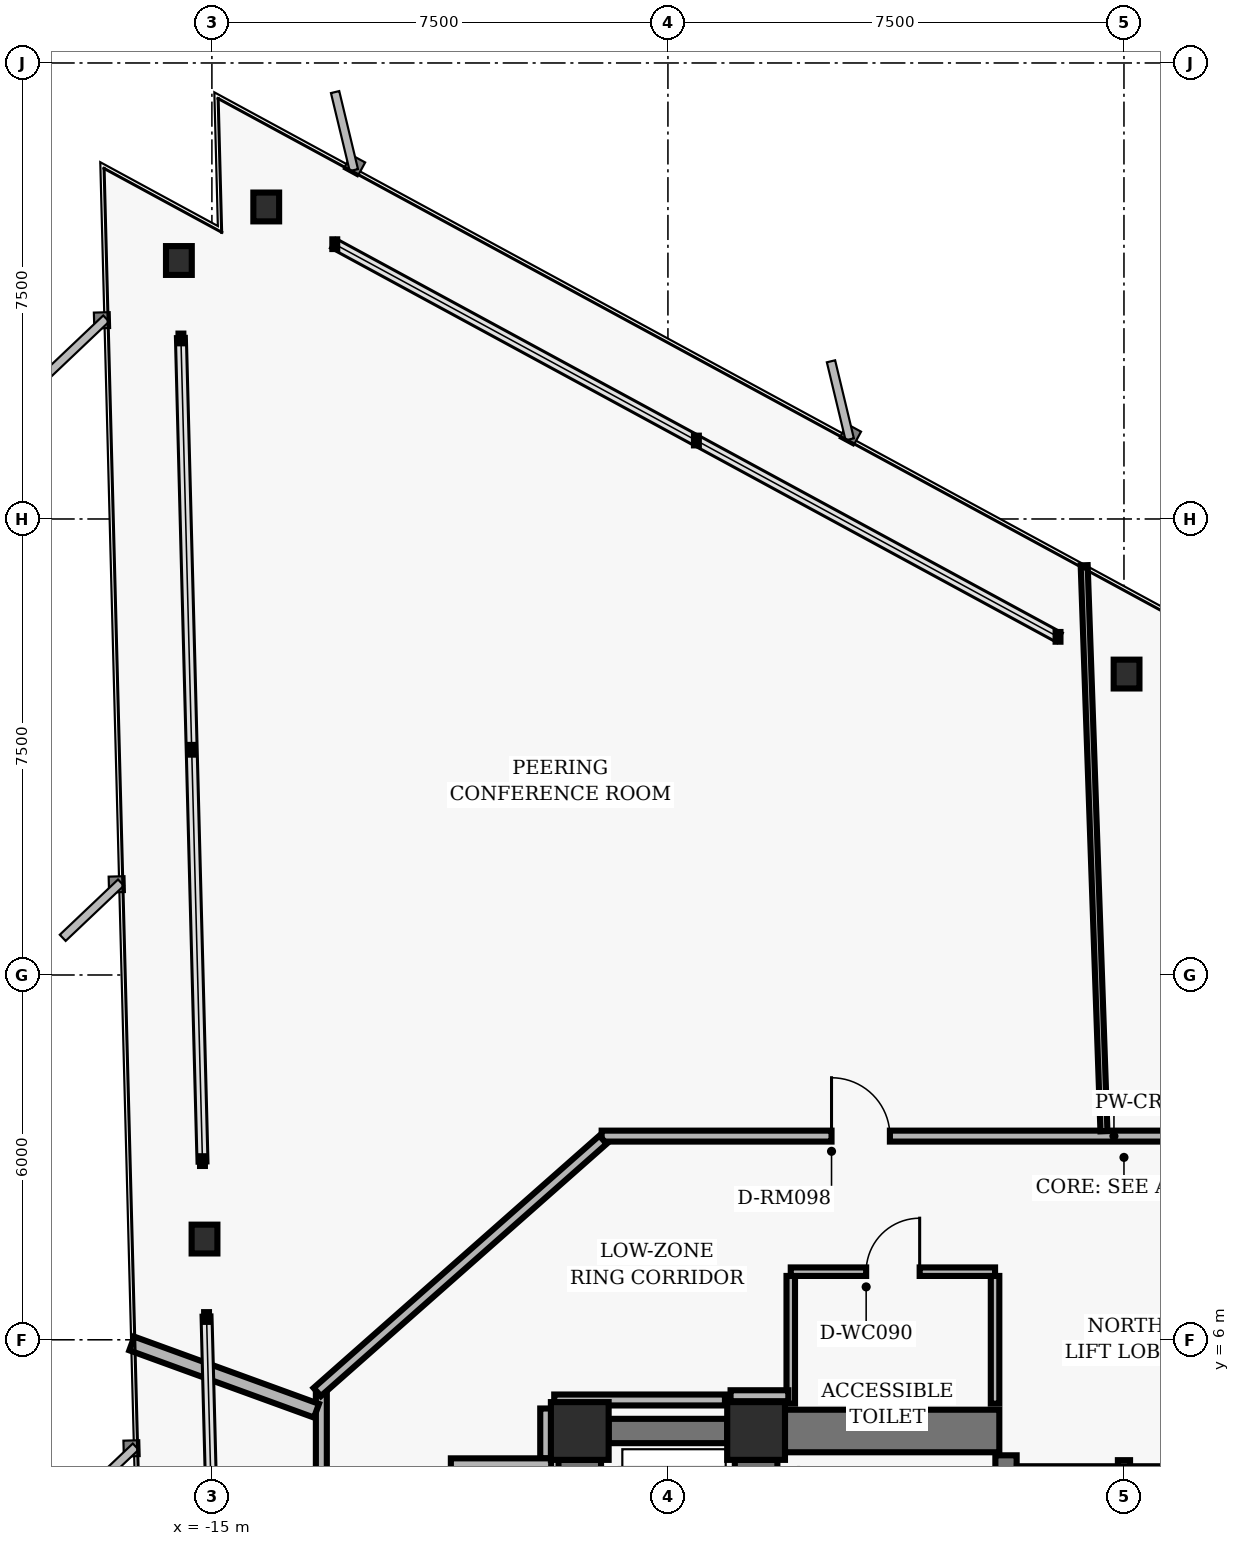
"""IFC4 building model, lengths in metres.
Left out: names, types, materials, properties, quantities, classifications, styles, units other than length and angle.
Written with IfcOpenShell. Run it as: python <this file> out.ifc"""

import sys

from ifc_helpers import new_model, si_unit, direction, frame, frame_2d, origin, origin_2d, place, context, subcontext, project, spatial, rectangle, hollow_rectangle, i_section, extrude, element, fill, save


model = new_model("IFC4")
c1 = context("Model", 3, precision=1e-05, world=origin(), true_north=direction((0.0, 1.0)))
c2 = subcontext(c1, "Body", "Model", "MODEL_VIEW")
j1 = project(units=[si_unit("LENGTHUNIT", "METRE"), si_unit("PLANEANGLEUNIT", "RADIAN")], contexts=[c1])
p1 = place(None, origin())
s1 = spatial("IfcSite", under=j1, at=p1, CompositionType="ELEMENT")
p2 = place(p1, origin())
s2 = spatial("IfcBuilding", under=s1, at=p2, CompositionType="ELEMENT")
p3 = place(p2, frame((0.0, 0.0, 42.4)))
s3 = spatial("IfcBuildingStorey", under=s2, at=p3, CompositionType="ELEMENT", Elevation=42.4)
for number, where, z_axis, x_axis in (
    (1, (-6.05, 4.5, 0.0), (0.0, 0.0, 1.0), (1.0, 0.0, 0.0)),
    (2, (-8.95, 4.5, 0.0), (0.0, 0.0, 1.0), (1.0, 0.0, 0.0)),
):
    element("IfcColumn", number, at=place(p3, frame(where, z_axis=z_axis, x_axis=x_axis)), inside=s3, PredefinedType="COLUMN", context=c2, shape_type="SweptSolid", body=[
        extrude(hollow_rectangle(XDim=0.95, YDim=0.95, WallThickness=0.06, InnerFilletRadius=0.02, OuterFilletRadius=0.04, at=origin_2d()), origin(), (0.0, 0.0, 1.0), 3.36),
    ])
p4 = place(p3, frame((-6.05, 0.475, 0.0), z_axis=(0.0, 0.0, 1.0), x_axis=(0.0, 1.0, 0.0)))
e3 = element("IfcWall", 3, at=p4, inside=s3, PredefinedType="SHEAR", context=c2, shape_type="SweptSolid", body=[
    extrude(rectangle(XDim=3.55, YDim=0.7, at=frame_2d((1.775, 0.0))), origin(), (0.0, 0.0, 1.0), 3.038),
])
p5 = place(p3, frame((-1.94, -4.1, 0.0), z_axis=(0.0, 0.0, 1.0), x_axis=(0.0, 1.0, 0.0)))
e4 = element("IfcWall", 4, at=p5, inside=s3, PredefinedType="SHEAR", context=c2, shape_type="SweptSolid", body=[
    extrude(rectangle(XDim=8.2, YDim=0.35, at=frame_2d((4.1, 0.0))), origin(), (0.0, 0.0, 1.0), 3.038),
])
p6 = place(p3, frame((-5.575, 4.5, 0.0), z_axis=(0.0, 0.0, 1.0), x_axis=(1.0, 0.0, 0.0)))
e5 = element("IfcWall", 5, at=p6, inside=s3, PredefinedType="SHEAR", context=c2, shape_type="SweptSolid", body=[
    extrude(rectangle(XDim=3.525, YDim=0.7, at=frame_2d((1.762, 0.0))), origin(), (0.0, 0.0, 1.0), 3.038),
])
p7 = place(p3, frame((-8.95, -3.825, 0.0), z_axis=(0.0, 0.0, 1.0), x_axis=(0.0, 1.0, 0.0)))
e6 = element("IfcWall", 6, at=p7, inside=s3, PredefinedType="SHEAR", context=c2, shape_type="SweptSolid", body=[
    extrude(rectangle(XDim=7.85, YDim=0.7, at=frame_2d((3.925, 0.0))), origin(), (0.0, 0.0, 1.0), 3.038),
])
p8 = place(p7, frame((0.55, 0.0, 0.0)))
e7 = element("IfcOpeningElement", 7, at=p8, cuts=e6, PredefinedType="OPENING", context=c2, shape_type="SweptSolid", body=[
    extrude(rectangle(XDim=1.06, YDim=2.04, at=frame_2d((0.53, 1.02))), frame((0.0, 0.36, 0.0), z_axis=(0.0, -1.0, 0.0), x_axis=(1.0, 0.0, 0.0)), (0.0, 0.0, 1.0), 0.72),
])
p9 = place(p7, frame((3.395, 0.0, 0.0)))
e8 = element("IfcOpeningElement", 8, at=p9, cuts=e6, PredefinedType="OPENING", context=c2, shape_type="SweptSolid", body=[
    extrude(rectangle(XDim=1.06, YDim=2.04, at=frame_2d((0.53, 1.02))), frame((0.0, 0.36, 0.0), z_axis=(0.0, -1.0, 0.0), x_axis=(1.0, 0.0, 0.0)), (0.0, 0.0, 1.0), 0.72),
])
p10 = place(p7, frame((6.23, 0.0, 0.0)))
e9 = element("IfcOpeningElement", 9, at=p10, cuts=e6, PredefinedType="OPENING", context=c2, shape_type="SweptSolid", body=[
    extrude(rectangle(XDim=1.06, YDim=2.04, at=frame_2d((0.53, 1.02))), frame((0.0, 0.36, 0.0), z_axis=(0.0, -1.0, 0.0), x_axis=(1.0, 0.0, 0.0)), (0.0, 0.0, 1.0), 0.72),
])
p11 = place(p3, frame((-8.475, 4.5, 0.0), z_axis=(0.0, 0.0, 1.0), x_axis=(1.0, 0.0, 0.0)))
e10 = element("IfcWall", 10, at=p11, inside=s3, PredefinedType="SHEAR", context=c2, shape_type="SweptSolid", body=[
    extrude(rectangle(XDim=1.95, YDim=0.4, at=frame_2d((0.975, 0.0))), origin(), (0.0, 0.0, 1.0), 3.038),
])
for number, where, z_axis, x_axis in (
    (11, (0.043, 16.949, 0.0), (0.0, 0.0, 1.0), (1.0, 0.0, 0.0)),
    (12, (-14.106, 24.632, 0.0), (0.0, 0.0, 1.0), (1.0, 0.0, 0.0)),
    (13, (-15.543, 23.751, 0.0), (0.0, 0.0, 1.0), (1.0, 0.0, 0.0)),
    (14, (-15.121, 7.657, 0.0), (0.0, 0.0, 1.0), (1.0, 0.0, 0.0)),
):
    element("IfcColumn", number, at=place(p3, frame(where, z_axis=z_axis, x_axis=x_axis)), inside=s3, PredefinedType="COLUMN", context=c2, shape_type="SweptSolid", body=[
        extrude(i_section(OverallWidth=0.424, OverallDepth=0.474, WebThickness=0.048, FlangeThickness=0.077, FilletRadius=0.025, at=origin_2d()), origin(), (0.0, 0.0, 1.0), 3.36),
    ])
p12 = place(p3, frame((0.0, 1.25, 0.0), z_axis=(0.0, 0.0, 1.0), x_axis=(0.0, 1.0, 0.0)))
e15 = element("IfcWall", 15, at=p12, inside=s3, PredefinedType="PARTITIONING", context=c2, shape_type="SweptSolid", body=[
    extrude(rectangle(XDim=2.77, YDim=0.2, at=frame_2d((1.385, 0.0))), origin(), (0.0, 0.0, 1.0), 3.013),
])
p13 = place(p3, frame((-1.76, 3.82, 0.0), z_axis=(0.0, 0.0, 1.0), x_axis=(1.0, 0.0, 0.0)))
e16 = element("IfcWall", 16, at=p13, inside=s3, PredefinedType="PARTITIONING", context=c2, shape_type="SweptSolid", body=[
    extrude(rectangle(XDim=3.52, YDim=0.2, at=frame_2d((1.76, 0.0))), origin(), (0.0, 0.0, 1.0), 3.013),
])
for number, where, z_axis, x_axis in (
    (17, (-5.48, 4.95, 0.0), (0.0, 0.0, 1.0), (0.0, 1.0, 0.0)),
    (18, (-2.12, 4.95, 0.0), (0.0, 0.0, 1.0), (0.0, 1.0, 0.0)),
):
    element("IfcWall", number, at=place(p3, frame(where, z_axis=z_axis, x_axis=x_axis)), inside=s3, PredefinedType="PARTITIONING", context=c2, shape_type="SweptSolid", body=[
        extrude(rectangle(XDim=2.1, YDim=0.14, at=frame_2d((1.05, 0.0))), origin(), (0.0, 0.0, 1.0), 3.013),
    ])
p14 = place(p3, frame((-5.48, 7.12, 0.0), z_axis=(0.0, 0.0, 1.0), x_axis=(1.0, 0.0, 0.0)))
e19 = element("IfcWall", 19, at=p14, inside=s3, PredefinedType="PARTITIONING", context=c2, shape_type="SweptSolid", body=[
    extrude(rectangle(XDim=3.36, YDim=0.14, at=frame_2d((1.68, 0.0))), origin(), (0.0, 0.0, 1.0), 3.013),
])
p15 = place(p14, frame((1.24, 0.0, 0.0)))
e20 = element("IfcOpeningElement", 20, at=p15, cuts=e19, PredefinedType="OPENING", context=c2, shape_type="SweptSolid", body=[
    extrude(rectangle(XDim=0.88, YDim=2.02, at=frame_2d((0.44, 1.01))), frame((0.0, 0.08, 0.0), z_axis=(0.0, -1.0, 0.0), x_axis=(1.0, 0.0, 0.0)), (0.0, 0.0, 1.0), 0.16),
])
p16 = place(p3, frame((-8.59, 9.35, 0.0), z_axis=(0.0, 0.0, 1.0), x_axis=(1.0, 0.0, 0.0)))
e21 = element("IfcWall", 21, at=p16, inside=s3, PredefinedType="PARTITIONING", context=c2, shape_type="SweptSolid", body=[
    extrude(rectangle(XDim=17.18, YDim=0.18, at=frame_2d((8.59, 0.0))), origin(), (0.0, 0.0, 1.0), 2.527),
])
p17 = place(p16, frame((12.11, 0.0, 0.0)))
e22 = element("IfcOpeningElement", 22, at=p17, cuts=e21, PredefinedType="OPENING", context=c2, shape_type="SweptSolid", body=[
    extrude(rectangle(XDim=0.96, YDim=2.02, at=frame_2d((0.48, 1.01))), frame((0.0, 0.1, 0.0), z_axis=(0.0, -1.0, 0.0), x_axis=(1.0, 0.0, 0.0)), (0.0, 0.0, 1.0), 0.2),
])
p18 = place(p16, frame((3.781, 0.0, 0.0)))
e23 = element("IfcOpeningElement", 23, at=p18, cuts=e21, PredefinedType="OPENING", context=c2, shape_type="SweptSolid", body=[
    extrude(rectangle(XDim=0.96, YDim=2.02, at=frame_2d((0.48, 1.01))), frame((0.0, 0.1, 0.0), z_axis=(0.0, -1.0, 0.0), x_axis=(1.0, 0.0, 0.0)), (0.0, 0.0, 1.0), 0.2),
])
p19 = place(p3, frame((-13.2, -5.11, 0.0), z_axis=(0.0, 0.0, 1.0), x_axis=(0.0, 1.0, 0.0)))
e24 = element("IfcWall", 24, at=p19, inside=s3, PredefinedType="PARTITIONING", context=c2, shape_type="SweptSolid", body=[
    extrude(rectangle(XDim=10.22, YDim=0.18, at=frame_2d((5.11, 0.0))), origin(), (0.0, 0.0, 1.0), 2.527),
])
p20 = place(p19, frame((4.621, 0.0, 0.0)))
e25 = element("IfcOpeningElement", 25, at=p20, cuts=e24, PredefinedType="OPENING", context=c2, shape_type="SweptSolid", body=[
    extrude(rectangle(XDim=0.96, YDim=2.02, at=frame_2d((0.48, 1.01))), frame((0.0, 0.1, 0.0), z_axis=(0.0, -1.0, 0.0), x_axis=(1.0, 0.0, 0.0)), (0.0, 0.0, 1.0), 0.2),
])
p21 = place(p3, frame((-13.268, 5.14, 0.0), z_axis=(0.0, 0.0, 1.0), x_axis=(0.749626463267, 0.66186113768, 0.0)))
e26 = element("IfcWall", 26, at=p21, inside=s3, PredefinedType="PARTITIONING", context=c2, shape_type="SweptSolid", body=[
    extrude(rectangle(XDim=6.27, YDim=0.18, at=frame_2d((3.135, 0.0))), origin(), (0.0, 0.0, 1.0), 3.013),
])
p22 = place(p3, frame((-9.51, 4.87, 0.0), z_axis=(0.0, 0.0, 1.0), x_axis=(0.0, -1.0, 0.0)))
e27 = element("IfcWall", 27, at=p22, inside=s3, PredefinedType="PARTITIONING", context=c2, shape_type="SweptSolid", body=[
    extrude(rectangle(XDim=0.82, YDim=0.18, at=frame_2d((0.41, 0.0))), origin(), (0.0, 0.0, 1.0), 3.013),
])
p23 = place(p3, frame((-9.42, 3.96, 0.0), z_axis=(0.0, 0.0, 1.0), x_axis=(-1.0, 0.0, 0.0)))
e28 = element("IfcWall", 28, at=p23, inside=s3, PredefinedType="PARTITIONING", context=c2, shape_type="SweptSolid", body=[
    extrude(rectangle(XDim=1.65, YDim=0.18, at=frame_2d((0.825, 0.0))), origin(), (0.0, 0.0, 1.0), 3.013),
])
p24 = place(p3, frame((-5.52, 5.08, 0.0), z_axis=(0.0, 0.0, 1.0), x_axis=(-1.0, 0.0, 0.0)))
e29 = element("IfcWall", 29, at=p24, inside=s3, PredefinedType="PARTITIONING", context=c2, shape_type="SweptSolid", body=[
    extrude(rectangle(XDim=0.95, YDim=0.18, at=frame_2d((0.475, 0.0))), origin(), (0.0, 0.0, 1.0), 3.013),
])
p25 = place(p3, frame((-6.562, 5.01, 0.0), z_axis=(0.0, 0.0, 1.0), x_axis=(-1.0, 0.0, 0.0)))
e30 = element("IfcWall", 30, at=p25, inside=s3, PredefinedType="PARTITIONING", context=c2, shape_type="SweptSolid", body=[
    extrude(rectangle(XDim=2.808, YDim=0.18, at=frame_2d((1.404, 0.0))), origin(), (0.0, 0.0, 1.0), 3.013),
])
p26 = place(p3, frame((-0.329, 9.43, 0.0), z_axis=(0.0, 0.0, 1.0), x_axis=(-0.034885649993, 0.999391310461, 0.0)))
e31 = element("IfcWall", 31, at=p26, inside=s3, PredefinedType="MOVABLE", context=c2, shape_type="SweptSolid", body=[
    extrude(rectangle(XDim=9.315, YDim=0.115, at=frame_2d((4.657, 0.0))), origin(), (0.0, 0.0, 1.0), 3.013),
])
p27 = place(p3, frame((-13.28, 4.833, 0.0), z_axis=(0.0, 0.0, 1.0), x_axis=(-0.939702957278, 0.341991742712, 0.0)))
e32 = element("IfcWall", 32, at=p27, inside=s3, PredefinedType="PARTITIONING", context=c2, shape_type="SweptSolid", body=[
    extrude(rectangle(XDim=3.232, YDim=0.24, at=frame_2d((1.616, 0.0))), origin(), (0.0, 0.0, 1.0), 3.013),
])
p28 = place(p15, origin())
e33 = element("IfcDoor", 33, at=p28, inside=s3, OperationType="SINGLE_SWING_RIGHT", PredefinedType="DOOR", context=c2, shape_type="SweptSolid", body=[
    extrude(rectangle(XDim=0.88, YDim=2.02, at=frame_2d((0.44, 1.01))), frame((0.0, 0.025, 0.0), z_axis=(0.0, -1.0, 0.0), x_axis=(1.0, 0.0, 0.0)), (0.0, 0.0, 1.0), 0.05),
])
fill(e20, e33)
p29 = place(p18, origin())
e34 = element("IfcDoor", 34, at=p29, inside=s3, OperationType="SINGLE_SWING_LEFT", PredefinedType="DOOR", context=c2, shape_type="SweptSolid", body=[
    extrude(rectangle(XDim=0.96, YDim=2.02, at=frame_2d((0.48, 1.01))), frame((0.0, 0.025, 0.0), z_axis=(0.0, -1.0, 0.0), x_axis=(1.0, 0.0, 0.0)), (0.0, 0.0, 1.0), 0.05),
])
fill(e23, e34)
save(model, sys.argv[1])
